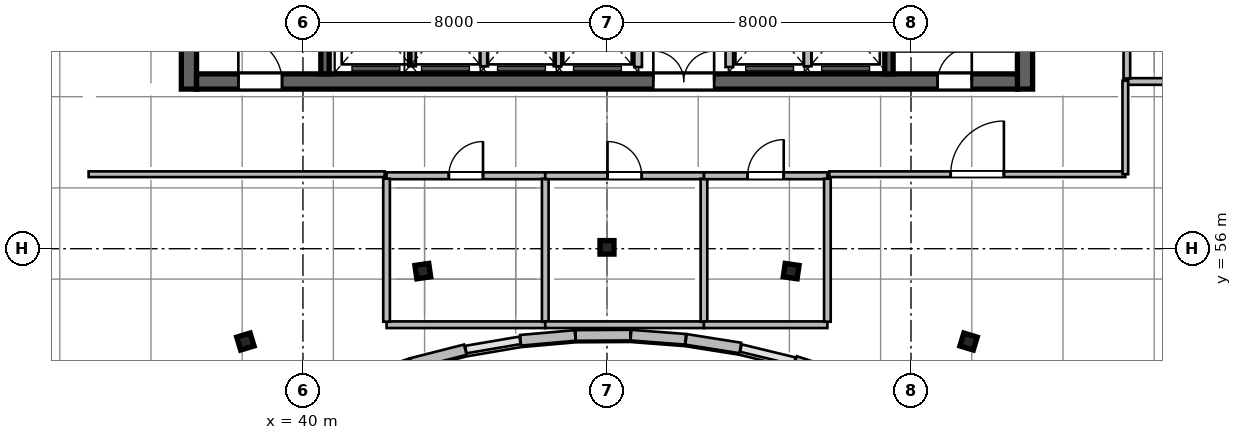
"""IFC4 building model, lengths in metres.
Left out: names, types, materials, properties, quantities, classifications, styles, units other than length and angle.
Written with IfcOpenShell. Run it as: python <this file> out.ifc"""

import sys

from ifc_helpers import new_model, si_unit, direction, frame, frame_2d, origin, origin_2d, place, context, subcontext, project, spatial, rectangle, i_section, extrude, source, transform, mapped, element, fill, save


model = new_model("IFC4")
c1 = context("Model", 3, precision=1e-05, world=origin(), true_north=direction((0.0, 1.0)))
c2 = subcontext(c1, "Body", "Model", "MODEL_VIEW")
j1 = project(units=[si_unit("LENGTHUNIT", "METRE"), si_unit("PLANEANGLEUNIT", "RADIAN")], contexts=[c1])
p1 = place(None, origin())
s1 = spatial("IfcSite", under=j1, at=p1, CompositionType="ELEMENT")
p2 = place(p1, origin())
s2 = spatial("IfcBuilding", under=s1, at=p2, CompositionType="ELEMENT")
p3 = place(p2, frame((0.0, 0.0, 303.0)))
s3 = spatial("IfcBuildingStorey", under=s2, at=p3, CompositionType="ELEMENT", Elevation=303.0)
m1 = source(origin(), c2, "Body", "SweptSolid", [
    extrude(rectangle(XDim=12.0, YDim=0.4, at=frame_2d((6.0, 0.0))), origin(), (0.0, 0.0, 1.0), 4.8),
])
for number, where, z_axis, x_axis in (
    (1, (37.0, 60.2, 0.0), (0.0, 0.0, 1.0), (0.0, 1.0, 0.0)),
    (2, (59.0, 60.2, 0.0), (0.0, 0.0, 1.0), (0.0, 1.0, 0.0)),
):
    element("IfcWall", number, at=place(p3, frame(where, z_axis=z_axis, x_axis=x_axis)), inside=s3, PredefinedType="SHEAR", context=c2, shape_type="MappedRepresentation", body=[
        mapped(m1, transform((0.0, 0.0, 0.0), scale=1.0)),
    ])
m2 = source(origin(), c2, "Body", "SweptSolid", [
    extrude(rectangle(XDim=21.6, YDim=0.4, at=frame_2d((10.8, 0.0))), origin(), (0.0, 0.0, 1.0), 4.8),
])
p4 = place(p3, frame((37.2, 60.4, 0.0), z_axis=(0.0, 0.0, 1.0), x_axis=(1.0, 0.0, 0.0)))
e3 = element("IfcWall", 3, at=p4, inside=s3, PredefinedType="SHEAR", context=c2, shape_type="MappedRepresentation", body=[
    mapped(m2, transform((0.0, 0.0, 0.0), scale=1.0)),
])
p5 = place(p4, frame((1.1, 0.0, 0.0)))
e4 = element("IfcOpeningElement", 4, at=p5, cuts=e3, PredefinedType="OPENING", context=c2, shape_type="SweptSolid", body=[
    extrude(rectangle(XDim=1.15, YDim=2.15, at=frame_2d((0.575, 1.075))), frame((0.0, 0.21, 0.0), z_axis=(0.0, -1.0, 0.0), x_axis=(1.0, 0.0, 0.0)), (0.0, 0.0, 1.0), 0.42),
])
p6 = place(p4, frame((19.5, 0.0, 0.0)))
e5 = element("IfcOpeningElement", 5, at=p6, cuts=e3, PredefinedType="OPENING", context=c2, shape_type="SweptSolid", body=[
    extrude(rectangle(XDim=0.9, YDim=2.1, at=frame_2d((0.45, 1.05))), frame((0.0, 0.21, 0.0), z_axis=(0.0, -1.0, 0.0), x_axis=(1.0, 0.0, 0.0)), (0.0, 0.0, 1.0), 0.42),
])
p7 = place(p4, frame((12.02, 0.0, 0.0)))
e6 = element("IfcOpeningElement", 6, at=p7, cuts=e3, PredefinedType="OPENING", context=c2, shape_type="SweptSolid", body=[
    extrude(rectangle(XDim=1.6, YDim=2.15, at=frame_2d((0.8, 1.075))), frame((0.0, 0.21, 0.0), z_axis=(0.0, -1.0, 0.0), x_axis=(1.0, 0.0, 0.0)), (0.0, 0.0, 1.0), 0.42),
])
m3 = source(origin(), c2, "Body", "SweptSolid", [
    extrude(rectangle(XDim=11.2, YDim=0.22, at=frame_2d((5.6, 0.0))), origin(), (0.0, 0.0, 1.0), 4.8),
])
p8 = place(p3, frame((40.58, 60.6, 0.0), z_axis=(0.0, 0.0, 1.0), x_axis=(0.0, 1.0, 0.0)))
e7 = element("IfcWall", 7, at=p8, inside=s3, PredefinedType="SHEAR", context=c2, shape_type="MappedRepresentation", body=[
    mapped(m3, transform((0.0, 0.0, 0.0), scale=1.0)),
])
p9 = place(p3, frame((55.42, 60.6, 0.0), z_axis=(0.0, 0.0, 1.0), x_axis=(0.0, 1.0, 0.0)))
e8 = element("IfcWall", 8, at=p9, inside=s3, PredefinedType="SHEAR", context=c2, shape_type="MappedRepresentation", body=[
    mapped(m3, transform((0.0, 0.0, 0.0), scale=1.0)),
])
p10 = place(p9, frame((9.645, 0.0, 0.0)))
e9 = element("IfcOpeningElement", 9, at=p10, cuts=e8, PredefinedType="OPENING", context=c2, shape_type="SweptSolid", body=[
    extrude(rectangle(XDim=1.15, YDim=2.15, at=frame_2d((0.575, 1.075))), frame((0.0, 0.12, 0.0), z_axis=(0.0, -1.0, 0.0), x_axis=(1.0, 0.0, 0.0)), (0.0, 0.0, 1.0), 0.24),
])
m4 = source(origin(), c2, "Body", "SweptSolid", [
    extrude(i_section(OverallWidth=0.369, OverallDepth=0.356, WebThickness=0.011, FlangeThickness=0.018, at=origin_2d()), origin(), (0.0, 0.0, 1.0), 4.8),
])
for number, where, z_axis, x_axis in (
    (10, (38.485, 53.558, 0.0), (0.0, 0.0, 1.0), (-0.289, 0.957, 0.0)),
    (11, (43.154, 55.411, 0.0), (0.0, 0.0, 1.0), (-0.143, 0.99, 0.0)),
    (12, (48.0, 56.036, 0.0), (0.0, 0.0, 1.0), (0.0, 1.0, 0.0)),
    (13, (52.846, 55.411, 0.0), (0.0, 0.0, 1.0), (0.143, 0.99, 0.0)),
    (14, (57.515, 53.558, 0.0), (0.0, 0.0, 1.0), (0.289, 0.957, 0.0)),
):
    element("IfcColumn", number, at=place(p3, frame(where, z_axis=z_axis, x_axis=x_axis)), inside=s3, PredefinedType="COLUMN", context=c2, shape_type="MappedRepresentation", body=[
        mapped(m4, transform((0.0, 0.0, 0.0), scale=1.0)),
    ])
m5 = source(origin(), c2, "Body", "SweptSolid", [
    extrude(rectangle(XDim=1.47, YDim=0.28, at=frame_2d((0.735, 0.0))), origin(), (0.0, 0.0, 1.0), 4.54),
])
p11 = place(p3, frame((54.35, 52.58, 0.0), z_axis=(0.0, 0.0, 1.0), x_axis=(-0.950248878954, 0.311491682145, 0.0)))
e15 = element("IfcWall", 15, at=p11, inside=s3, PredefinedType="SOLIDWALL", context=c2, shape_type="MappedRepresentation", body=[
    mapped(m5, transform((0.0, 0.0, 0.0), scale=1.0)),
])
m6 = source(origin(), c2, "Body", "SweptSolid", [
    extrude(rectangle(XDim=1.446, YDim=0.28, at=frame_2d((0.723, 0.0))), origin(), (0.0, 0.0, 1.0), 4.54),
])
p12 = place(p3, frame((51.509, 53.388, 0.0), z_axis=(0.0, 0.0, 1.0), x_axis=(-0.987650460941, 0.156673440642, 0.0)))
e16 = element("IfcWall", 16, at=p12, inside=s3, PredefinedType="SOLIDWALL", context=c2, shape_type="MappedRepresentation", body=[
    mapped(m6, transform((0.0, 0.0, 0.0), scale=1.0)),
])
m7 = source(origin(), c2, "Body", "SweptSolid", [
    extrude(rectangle(XDim=1.44, YDim=0.28, at=frame_2d((0.72, 0.0))), origin(), (0.0, 0.0, 1.0), 4.54),
])
p13 = place(p3, frame((50.066, 53.616, 0.0), z_axis=(0.0, 0.0, 1.0), x_axis=(-0.997124860794, 0.075776064736, 0.0)))
e17 = element("IfcWall", 17, at=p13, inside=s3, PredefinedType="SOLIDWALL", context=c2, shape_type="MappedRepresentation", body=[
    mapped(m7, transform((0.0, 0.0, 0.0), scale=1.0)),
])
m8 = source(origin(), c2, "Body", "SweptSolid", [
    extrude(rectangle(XDim=1.438, YDim=0.28, at=frame_2d((0.719, 0.0))), origin(), (0.0, 0.0, 1.0), 4.54),
])
p14 = place(p3, frame((48.615, 53.726, 0.0), z_axis=(0.0, 0.0, 1.0), x_axis=(-0.999982357135, -0.005940153174, 0.0)))
e18 = element("IfcWall", 18, at=p14, inside=s3, PredefinedType="SOLIDWALL", context=c2, shape_type="MappedRepresentation", body=[
    mapped(m8, transform((0.0, 0.0, 0.0), scale=1.0)),
])
m9 = source(origin(), c2, "Body", "SweptSolid", [
    extrude(rectangle(XDim=1.441, YDim=0.28, at=frame_2d((0.72, 0.0))), origin(), (0.0, 0.0, 1.0), 4.54),
])
p15 = place(p3, frame((47.162, 53.717, 0.0), z_axis=(0.0, 0.0, 1.0), x_axis=(-0.99617032352, -0.087433898101, 0.0)))
e19 = element("IfcWall", 19, at=p15, inside=s3, PredefinedType="SOLIDWALL", context=c2, shape_type="MappedRepresentation", body=[
    mapped(m9, transform((0.0, 0.0, 0.0), scale=1.0)),
])
m10 = source(origin(), c2, "Body", "SweptSolid", [
    extrude(rectangle(XDim=1.458, YDim=0.28, at=frame_2d((0.729, 0.0))), origin(), (0.0, 0.0, 1.0), 4.54),
])
p16 = place(p3, frame((44.271, 53.343, 0.0), z_axis=(0.0, 0.0, 1.0), x_axis=(-0.969109544438, -0.246630677083, 0.0)))
e20 = element("IfcWall", 20, at=p16, inside=s3, PredefinedType="SOLIDWALL", context=c2, shape_type="MappedRepresentation", body=[
    mapped(m10, transform((0.0, 0.0, 0.0), scale=1.0)),
])
m11 = source(origin(), c2, "Body", "SweptSolid", [
    extrude(rectangle(XDim=1.473, YDim=0.28, at=frame_2d((0.736, 0.0))), origin(), (0.0, 0.0, 1.0), 4.54),
])
p17 = place(p3, frame((42.845, 52.979, 0.0), z_axis=(0.0, 0.0, 1.0), x_axis=(-0.946641296917, -0.322289086026, 0.0)))
e21 = element("IfcWall", 21, at=p17, inside=s3, PredefinedType="SOLIDWALL", context=c2, shape_type="MappedRepresentation", body=[
    mapped(m11, transform((0.0, 0.0, 0.0), scale=1.0)),
])
m12 = source(origin(), c2, "Body", "SweptSolid", [
    extrude(rectangle(XDim=2.24, YDim=0.2, at=frame_2d((1.12, 0.0))), origin(), (0.0, 0.0, 1.0), 4.54),
])
for number, where, z_axis, x_axis in (
    (22, (48.82, 60.78, 0.0), (0.0, 0.0, 1.0), (0.0, 1.0, 0.0)),
    (23, (51.22, 60.78, 0.0), (0.0, 0.0, 1.0), (0.0, 1.0, 0.0)),
):
    element("IfcWall", number, at=place(p3, frame(where, z_axis=z_axis, x_axis=x_axis)), inside=s3, PredefinedType="SOLIDWALL", context=c2, shape_type="MappedRepresentation", body=[
        mapped(m12, transform((0.0, 0.0, 0.0), scale=1.0)),
    ])
m13 = source(origin(), c2, "Body", "SweptSolid", [
    extrude(rectangle(XDim=2.2, YDim=0.2, at=frame_2d((1.1, 0.0))), origin(), (0.0, 0.0, 1.0), 4.54),
])
for number, where, z_axis, x_axis in (
    (24, (42.87, 60.8, 0.0), (0.0, 0.0, 1.0), (0.0, 1.0, 0.0)),
    (25, (44.77, 60.8, 0.0), (0.0, 0.0, 1.0), (0.0, 1.0, 0.0)),
    (26, (46.7, 60.8, 0.0), (0.0, 0.0, 1.0), (0.0, 1.0, 0.0)),
    (27, (53.28, 60.8, 0.0), (0.0, 0.0, 1.0), (0.0, 1.0, 0.0)),
):
    element("IfcWall", number, at=place(p3, frame(where, z_axis=z_axis, x_axis=x_axis)), inside=s3, PredefinedType="SOLIDWALL", context=c2, shape_type="MappedRepresentation", body=[
        mapped(m13, transform((0.0, 0.0, 0.0), scale=1.0)),
    ])
m14 = source(origin(), c2, "Body", "SweptSolid", [
    extrude(rectangle(XDim=4.176, YDim=0.175, at=frame_2d((2.088, 0.0))), origin(), (0.0, 0.0, 1.0), 4.54),
])
p18 = place(p3, frame((42.2, 54.0, 0.0), z_axis=(0.0, 0.0, 1.0), x_axis=(1.0, 0.0, 0.0)))
e28 = element("IfcWall", 28, at=p18, inside=s3, PredefinedType="PARTITIONING", context=c2, shape_type="MappedRepresentation", body=[
    mapped(m14, transform((0.0, 0.0, 0.0), scale=1.0)),
])
m15 = source(origin(), c2, "Body", "SweptSolid", [
    extrude(rectangle(XDim=4.176, YDim=0.18, at=frame_2d((2.088, 0.0))), origin(), (0.0, 0.0, 1.0), 4.54),
])
p19 = place(p3, frame((42.2, 57.92, 0.0), z_axis=(0.0, 0.0, 1.0), x_axis=(1.0, 0.0, 0.0)))
e29 = element("IfcWall", 29, at=p19, inside=s3, PredefinedType="PLUMBINGWALL", context=c2, shape_type="MappedRepresentation", body=[
    mapped(m15, transform((0.0, 0.0, 0.0), scale=1.0)),
])
p20 = place(p19, frame((1.638, 0.0, 0.0)))
e30 = element("IfcOpeningElement", 30, at=p20, cuts=e29, PredefinedType="OPENING", context=c2, shape_type="SweptSolid", body=[
    extrude(rectangle(XDim=0.9, YDim=2.08, at=frame_2d((0.45, 1.04))), frame((0.0, 0.1, 0.0), z_axis=(0.0, -1.0, 0.0), x_axis=(1.0, 0.0, 0.0)), (0.0, 0.0, 1.0), 0.2),
])
m16 = source(origin(), c2, "Body", "SweptSolid", [
    extrude(rectangle(XDim=3.763, YDim=0.175, at=frame_2d((1.881, 0.0))), origin(), (0.0, 0.0, 1.0), 4.54),
])
for number, where, z_axis, x_axis in (
    (31, (42.2, 54.079, 0.0), (0.0, 0.0, 1.0), (0.0, 1.0, 0.0)),
    (32, (46.376, 54.079, 0.0), (0.0, 0.0, 1.0), (0.0, 1.0, 0.0)),
):
    element("IfcWall", number, at=place(p3, frame(where, z_axis=z_axis, x_axis=x_axis)), inside=s3, PredefinedType="PARTITIONING", context=c2, shape_type="MappedRepresentation", body=[
        mapped(m16, transform((0.0, 0.0, 0.0), scale=1.0)),
    ])
p21 = place(p3, frame((46.376, 54.0, 0.0), z_axis=(0.0, 0.0, 1.0), x_axis=(1.0, 0.0, 0.0)))
e33 = element("IfcWall", 33, at=p21, inside=s3, PredefinedType="PARTITIONING", context=c2, shape_type="MappedRepresentation", body=[
    mapped(m14, transform((0.0, 0.0, 0.0), scale=1.0)),
])
p22 = place(p3, frame((46.376, 57.92, 0.0), z_axis=(0.0, 0.0, 1.0), x_axis=(1.0, 0.0, 0.0)))
e34 = element("IfcWall", 34, at=p22, inside=s3, PredefinedType="PLUMBINGWALL", context=c2, shape_type="MappedRepresentation", body=[
    mapped(m15, transform((0.0, 0.0, 0.0), scale=1.0)),
])
p23 = place(p22, frame((1.638, 0.0, 0.0)))
e35 = element("IfcOpeningElement", 35, at=p23, cuts=e34, PredefinedType="OPENING", context=c2, shape_type="SweptSolid", body=[
    extrude(rectangle(XDim=0.9, YDim=2.08, at=frame_2d((0.45, 1.04))), frame((0.0, 0.1, 0.0), z_axis=(0.0, -1.0, 0.0), x_axis=(1.0, 0.0, 0.0)), (0.0, 0.0, 1.0), 0.2),
])
p24 = place(p3, frame((50.552, 54.079, 0.0), z_axis=(0.0, 0.0, 1.0), x_axis=(0.0, 1.0, 0.0)))
e36 = element("IfcWall", 36, at=p24, inside=s3, PredefinedType="PARTITIONING", context=c2, shape_type="MappedRepresentation", body=[
    mapped(m16, transform((0.0, 0.0, 0.0), scale=1.0)),
])
m17 = source(origin(), c2, "Body", "SweptSolid", [
    extrude(rectangle(XDim=3.248, YDim=0.175, at=frame_2d((1.624, 0.0))), origin(), (0.0, 0.0, 1.0), 4.54),
])
p25 = place(p3, frame((50.552, 54.0, 0.0), z_axis=(0.0, 0.0, 1.0), x_axis=(1.0, 0.0, 0.0)))
e37 = element("IfcWall", 37, at=p25, inside=s3, PredefinedType="PARTITIONING", context=c2, shape_type="MappedRepresentation", body=[
    mapped(m17, transform((0.0, 0.0, 0.0), scale=1.0)),
])
m18 = source(origin(), c2, "Body", "SweptSolid", [
    extrude(rectangle(XDim=3.248, YDim=0.18, at=frame_2d((1.624, 0.0))), origin(), (0.0, 0.0, 1.0), 4.54),
])
p26 = place(p3, frame((50.552, 57.92, 0.0), z_axis=(0.0, 0.0, 1.0), x_axis=(1.0, 0.0, 0.0)))
e38 = element("IfcWall", 38, at=p26, inside=s3, PredefinedType="PLUMBINGWALL", context=c2, shape_type="MappedRepresentation", body=[
    mapped(m18, transform((0.0, 0.0, 0.0), scale=1.0)),
])
p27 = place(p26, frame((1.149, 0.0, 0.0)))
e39 = element("IfcOpeningElement", 39, at=p27, cuts=e38, PredefinedType="OPENING", context=c2, shape_type="SweptSolid", body=[
    extrude(rectangle(XDim=0.95, YDim=2.12, at=frame_2d((0.475, 1.06))), frame((0.0, 0.1, 0.0), z_axis=(0.0, -1.0, 0.0), x_axis=(1.0, 0.0, 0.0)), (0.0, 0.0, 1.0), 0.2),
])
p28 = place(p3, frame((53.8, 54.079, 0.0), z_axis=(0.0, 0.0, 1.0), x_axis=(0.0, 1.0, 0.0)))
e40 = element("IfcWall", 40, at=p28, inside=s3, PredefinedType="PARTITIONING", context=c2, shape_type="MappedRepresentation", body=[
    mapped(m16, transform((0.0, 0.0, 0.0), scale=1.0)),
])
m19 = source(origin(), c2, "Body", "SweptSolid", [
    extrude(rectangle(XDim=7.52, YDim=0.175, at=frame_2d((3.76, 0.0))), origin(), (0.0, 0.0, 1.0), 4.54),
])
p29 = place(p3, frame((61.68, 60.4, 0.0), z_axis=(0.0, 0.0, 1.0), x_axis=(1.0, 0.0, 0.0)))
e41 = element("IfcWall", 41, at=p29, inside=s3, PredefinedType="PARTITIONING", context=c2, shape_type="MappedRepresentation", body=[
    mapped(m19, transform((0.0, 0.0, 0.0), scale=1.0)),
])
m20 = source(origin(), c2, "Body", "SweptSolid", [
    extrude(rectangle(XDim=5.042, YDim=0.175, at=frame_2d((2.521, 0.0))), origin(), (0.0, 0.0, 1.0), 4.54),
])
p30 = place(p3, frame((61.68, 60.479, 0.0), z_axis=(0.0, 0.0, 1.0), x_axis=(0.0, 1.0, 0.0)))
e42 = element("IfcWall", 42, at=p30, inside=s3, PredefinedType="PARTITIONING", context=c2, shape_type="MappedRepresentation", body=[
    mapped(m20, transform((0.0, 0.0, 0.0), scale=1.0)),
])
p31 = place(p30, frame((1.921, 0.0, 0.0)))
e43 = element("IfcOpeningElement", 43, at=p31, cuts=e42, PredefinedType="OPENING", context=c2, shape_type="SweptSolid", body=[
    extrude(rectangle(XDim=1.2, YDim=2.15, at=frame_2d((0.6, 1.075))), frame((0.0, 0.098, 0.0), z_axis=(0.0, -1.0, 0.0), x_axis=(1.0, 0.0, 0.0)), (0.0, 0.0, 1.0), 0.195),
])
m21 = source(origin(), c2, "Body", "SweptSolid", [
    extrude(rectangle(XDim=7.79, YDim=0.15, at=frame_2d((3.895, 0.0))), origin(), (0.0, 0.0, 1.0), 3.912),
])
p32 = place(p3, frame((34.36, 57.96, 0.0), z_axis=(0.0, 0.0, 1.0), x_axis=(1.0, 0.0, 0.0)))
e44 = element("IfcWall", 44, at=p32, inside=s3, PredefinedType="PARTITIONING", context=c2, shape_type="MappedRepresentation", body=[
    mapped(m21, transform((0.0, 0.0, 0.0), scale=1.0)),
])
p33 = place(p3, frame((53.85, 57.96, 0.0), z_axis=(0.0, 0.0, 1.0), x_axis=(1.0, 0.0, 0.0)))
e45 = element("IfcWall", 45, at=p33, inside=s3, PredefinedType="PARTITIONING", context=c2, shape_type="MappedRepresentation", body=[
    mapped(m21, transform((0.0, 0.0, 0.0), scale=1.0)),
])
p34 = place(p33, frame((3.195, 0.0, 0.0)))
e46 = element("IfcOpeningElement", 46, at=p34, cuts=e45, PredefinedType="OPENING", context=c2, shape_type="SweptSolid", body=[
    extrude(rectangle(XDim=1.4, YDim=2.15, at=frame_2d((0.7, 1.075))), frame((0.0, 0.085, 0.0), z_axis=(0.0, -1.0, 0.0), x_axis=(1.0, 0.0, 0.0)), (0.0, 0.0, 1.0), 0.17),
])
m22 = source(origin(), c2, "Body", "SweptSolid", [
    extrude(rectangle(XDim=2.46, YDim=0.15, at=frame_2d((1.23, 0.0))), origin(), (0.0, 0.0, 1.0), 4.54),
])
p35 = place(p3, frame((61.64, 57.96, 0.0), z_axis=(0.0, 0.0, 1.0), x_axis=(0.0, 1.0, 0.0)))
e47 = element("IfcWall", 47, at=p35, inside=s3, PredefinedType="PARTITIONING", context=c2, shape_type="MappedRepresentation", body=[
    mapped(m22, transform((0.0, 0.0, 0.0), scale=1.0)),
])
m23 = source(origin(), c2, "Body", "SweptSolid", [
    extrude(rectangle(XDim=1.15, YDim=2.15, at=frame_2d((0.575, 1.075))), frame((0.0, 0.025, 0.0), z_axis=(0.0, -1.0, 0.0), x_axis=(1.0, 0.0, 0.0)), (0.0, 0.0, 1.0), 0.05),
])
p36 = place(p5, origin())
e48 = element("IfcDoor", 48, at=p36, inside=s3, OperationType="SINGLE_SWING_LEFT", PredefinedType="DOOR", context=c2, shape_type="MappedRepresentation", body=[
    mapped(m23, transform((0.0, 0.0, 0.0), scale=1.0)),
])
fill(e4, e48)
m24 = source(origin(), c2, "Body", "SweptSolid", [
    extrude(rectangle(XDim=0.9, YDim=2.1, at=frame_2d((0.45, 1.05))), frame((0.0, 0.025, 0.0), z_axis=(0.0, -1.0, 0.0), x_axis=(1.0, 0.0, 0.0)), (0.0, 0.0, 1.0), 0.05),
])
p37 = place(p6, origin())
e49 = element("IfcDoor", 49, at=p37, inside=s3, OperationType="SINGLE_SWING_RIGHT", PredefinedType="DOOR", context=c2, shape_type="MappedRepresentation", body=[
    mapped(m24, transform((0.0, 0.0, 0.0), scale=1.0)),
])
fill(e5, e49)
m25 = source(origin(), c2, "Body", "SweptSolid", [
    extrude(rectangle(XDim=1.6, YDim=2.15, at=frame_2d((0.8, 1.075))), frame((0.0, 0.025, 0.0), z_axis=(0.0, -1.0, 0.0), x_axis=(1.0, 0.0, 0.0)), (0.0, 0.0, 1.0), 0.05),
])
p38 = place(p7, origin())
e50 = element("IfcDoor", 50, at=p38, inside=s3, OperationType="DOUBLE_DOOR_SINGLE_SWING", PredefinedType="DOOR", context=c2, shape_type="MappedRepresentation", body=[
    mapped(m25, transform((0.0, 0.0, 0.0), scale=1.0)),
])
fill(e6, e50)
m26 = source(origin(), c2, "Body", "SweptSolid", [
    extrude(rectangle(XDim=0.9, YDim=2.08, at=frame_2d((0.45, 1.04))), frame((0.0, 0.025, 0.0), z_axis=(0.0, -1.0, 0.0), x_axis=(1.0, 0.0, 0.0)), (0.0, 0.0, 1.0), 0.05),
])
p39 = place(p20, origin())
e51 = element("IfcDoor", 51, at=p39, inside=s3, OperationType="SINGLE_SWING_RIGHT", PredefinedType="DOOR", context=c2, shape_type="MappedRepresentation", body=[
    mapped(m26, transform((0.0, 0.0, 0.0), scale=1.0)),
])
fill(e30, e51)
p40 = place(p23, origin())
e52 = element("IfcDoor", 52, at=p40, inside=s3, OperationType="SINGLE_SWING_LEFT", PredefinedType="DOOR", context=c2, shape_type="MappedRepresentation", body=[
    mapped(m26, transform((0.0, 0.0, 0.0), scale=1.0)),
])
fill(e35, e52)
m27 = source(origin(), c2, "Body", "SweptSolid", [
    extrude(rectangle(XDim=0.95, YDim=2.12, at=frame_2d((0.475, 1.06))), frame((0.0, 0.025, 0.0), z_axis=(0.0, -1.0, 0.0), x_axis=(1.0, 0.0, 0.0)), (0.0, 0.0, 1.0), 0.05),
])
p41 = place(p27, origin())
e53 = element("IfcDoor", 53, at=p41, inside=s3, OperationType="SINGLE_SWING_RIGHT", PredefinedType="DOOR", context=c2, shape_type="MappedRepresentation", body=[
    mapped(m27, transform((0.0, 0.0, 0.0), scale=1.0)),
])
fill(e39, e53)
m28 = source(origin(), c2, "Body", "SweptSolid", [
    extrude(rectangle(XDim=1.4, YDim=2.15, at=frame_2d((0.7, 1.075))), frame((0.0, 0.025, 0.0), z_axis=(0.0, -1.0, 0.0), x_axis=(1.0, 0.0, 0.0)), (0.0, 0.0, 1.0), 0.05),
])
p42 = place(p34, origin())
e54 = element("IfcDoor", 54, at=p42, inside=s3, OperationType="SINGLE_SWING_RIGHT", PredefinedType="DOOR", context=c2, shape_type="MappedRepresentation", body=[
    mapped(m28, transform((0.0, 0.0, 0.0), scale=1.0)),
])
fill(e46, e54)
save(model, sys.argv[1])
